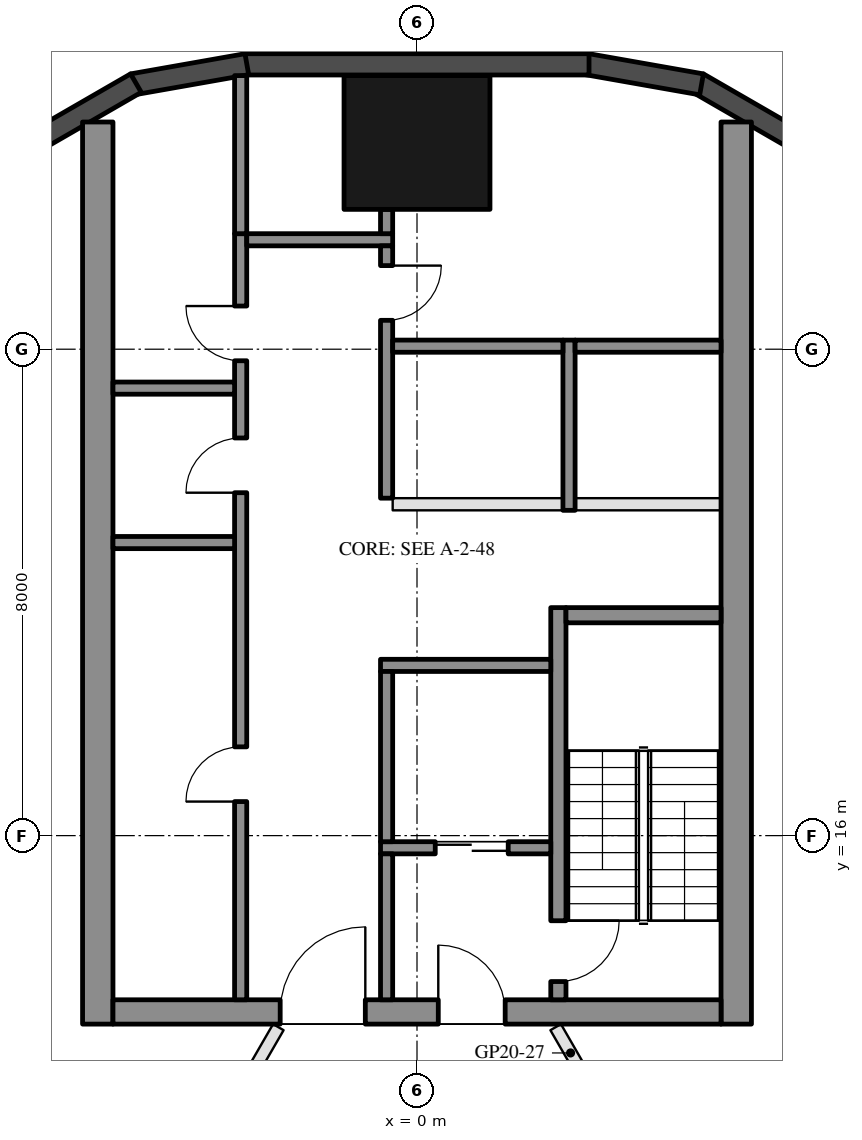
"""IFC4 building model, lengths in metres.
Left out: names, types, materials, properties, quantities, classifications, styles, units other than length and angle.
Written with IfcOpenShell. Run it as: python <this file> out.ifc"""

import sys

from ifc_helpers import new_model, si_unit, direction, frame, frame_2d, origin, origin_2d, place, context, subcontext, project, spatial, rectangle, hollow_rectangle, extrude, element, fill, save


model = new_model("IFC4")
c1 = context("Model", 3, precision=1e-05, world=origin(), true_north=direction((0.0, 1.0)))
c2 = subcontext(c1, "Body", "Model", "MODEL_VIEW")
j1 = project(units=[si_unit("LENGTHUNIT", "METRE"), si_unit("PLANEANGLEUNIT", "RADIAN")], contexts=[c1])
p1 = place(None, origin())
s1 = spatial("IfcSite", under=j1, at=p1, CompositionType="ELEMENT")
p2 = place(p1, origin())
s2 = spatial("IfcBuilding", under=s1, at=p2, CompositionType="ELEMENT")
p3 = place(p2, frame((0.0, 0.0, 209.5)))
s3 = spatial("IfcBuildingStorey", under=s2, at=p3, CompositionType="ELEMENT", Elevation=209.5)
p4 = place(p3, frame((0.0, 27.4, 0.0), z_axis=(0.0, 0.0, 1.0), x_axis=(1.0, 0.0, 0.0)))
e1 = element("IfcColumn", 1, at=p4, inside=s3, PredefinedType="COLUMN", context=c2, shape_type="SweptSolid", body=[
    extrude(hollow_rectangle(XDim=2.4, YDim=2.2, WallThickness=0.06, at=origin_2d()), origin(), (0.0, 0.0, 1.0), 3.7),
])
for number, where, z_axis, x_axis in (
    (2, (6.277, 27.422, 0.0), (0.0, 0.0, 1.0), (-0.866, 0.5, 0.0)),
    (3, (4.68, 28.356, 0.0), (0.0, 0.0, 1.0), (-0.985, 0.174, 0.0)),
):
    element("IfcWall", number, at=place(p3, frame(where, z_axis=z_axis, x_axis=x_axis)), inside=s3, PredefinedType="SOLIDWALL", context=c2, shape_type="SweptSolid", body=[
        extrude(rectangle(XDim=1.91, YDim=0.35, at=frame_2d((0.955, 0.0))), origin(), (0.0, 0.0, 1.0), 3.55),
    ])
p5 = place(p3, frame((2.829, 28.685, 0.0), z_axis=(0.0, 0.0, 1.0), x_axis=(-1.0, 0.0, 0.0)))
e4 = element("IfcWall", 4, at=p5, inside=s3, PredefinedType="SOLIDWALL", context=c2, shape_type="SweptSolid", body=[
    extrude(rectangle(XDim=5.658, YDim=0.35, at=frame_2d((2.829, 0.0))), origin(), (0.0, 0.0, 1.0), 3.55),
])
for number, where, z_axis, x_axis in (
    (5, (-2.799, 28.688, 0.0), (0.0, 0.0, 1.0), (-0.985, -0.174, 0.0)),
    (6, (-4.623, 28.377, 0.0), (0.0, 0.0, 1.0), (-0.866, -0.5, 0.0)),
):
    element("IfcWall", number, at=place(p3, frame(where, z_axis=z_axis, x_axis=x_axis)), inside=s3, PredefinedType="SOLIDWALL", context=c2, shape_type="SweptSolid", body=[
        extrude(rectangle(XDim=1.91, YDim=0.35, at=frame_2d((0.955, 0.0))), origin(), (0.0, 0.0, 1.0), 3.55),
    ])
for number, where, z_axis, x_axis in (
    (7, (5.25, 12.9, 0.0), (0.0, 0.0, 1.0), (0.0, 1.0, 0.0)),
    (8, (-5.25, 12.9, 0.0), (0.0, 0.0, 1.0), (0.0, 1.0, 0.0)),
):
    element("IfcWall", number, at=place(p3, frame(where, z_axis=z_axis, x_axis=x_axis)), inside=s3, PredefinedType="SHEAR", context=c2, shape_type="SweptSolid", body=[
        extrude(rectangle(XDim=14.837, YDim=0.5, at=frame_2d((7.418, 0.0))), origin(), (0.0, 0.0, 1.0), 3.5),
    ])
p6 = place(p3, frame((5.0, 13.1, 0.0), z_axis=(0.0, 0.0, 1.0), x_axis=(-1.0, 0.0, 0.0)))
e9 = element("IfcWall", 9, at=p6, inside=s3, PredefinedType="SHEAR", context=c2, shape_type="SweptSolid", body=[
    extrude(rectangle(XDim=10.0, YDim=0.4, at=frame_2d((5.0, 0.0))), origin(), (0.0, 0.0, 1.0), 3.5),
])
p7 = place(p6, frame((3.55, 0.0, 0.0)))
e10 = element("IfcOpeningElement", 10, at=p7, cuts=e9, PredefinedType="OPENING", context=c2, shape_type="SweptSolid", body=[
    extrude(rectangle(XDim=1.1, YDim=2.1, at=frame_2d((0.55, 1.05))), frame((0.0, 0.21, 0.0), z_axis=(0.0, -1.0, 0.0), x_axis=(1.0, 0.0, 0.0)), (0.0, 0.0, 1.0), 0.42),
])
p8 = place(p6, frame((5.85, 0.0, 0.0)))
e11 = element("IfcOpeningElement", 11, at=p8, cuts=e9, PredefinedType="OPENING", context=c2, shape_type="SweptSolid", body=[
    extrude(rectangle(XDim=1.4, YDim=2.1, at=frame_2d((0.7, 1.05))), frame((0.0, 0.21, 0.0), z_axis=(0.0, -1.0, 0.0), x_axis=(1.0, 0.0, 0.0)), (0.0, 0.0, 1.0), 0.42),
])
p9 = place(p3, frame((2.325, 13.3, 0.0), z_axis=(0.0, 0.0, 1.0), x_axis=(0.0, 1.0, 0.0)))
e12 = element("IfcWall", 12, at=p9, inside=s3, PredefinedType="SHEAR", context=c2, shape_type="SweptSolid", body=[
    extrude(rectangle(XDim=6.45, YDim=0.25, at=frame_2d((3.225, 0.0))), origin(), (0.0, 0.0, 1.0), 3.5),
])
p10 = place(p9, frame((0.3, 0.0, 0.0)))
e13 = element("IfcOpeningElement", 13, at=p10, cuts=e12, PredefinedType="OPENING", context=c2, shape_type="SweptSolid", body=[
    extrude(rectangle(XDim=1.0, YDim=2.1, at=frame_2d((0.5, 1.05))), frame((0.0, 0.135, 0.0), z_axis=(0.0, -1.0, 0.0), x_axis=(1.0, 0.0, 0.0)), (0.0, 0.0, 1.0), 0.27),
])
p11 = place(p3, frame((5.0, 19.625, 0.0), z_axis=(0.0, 0.0, 1.0), x_axis=(-1.0, 0.0, 0.0)))
e14 = element("IfcWall", 14, at=p11, inside=s3, PredefinedType="SHEAR", context=c2, shape_type="SweptSolid", body=[
    extrude(rectangle(XDim=2.55, YDim=0.25, at=frame_2d((1.275, 0.0))), origin(), (0.0, 0.0, 1.0), 3.5),
])
p12 = place(p3, frame((2.2, 18.8, 0.0), z_axis=(0.0, 0.0, 1.0), x_axis=(-1.0, 0.0, 0.0)))
e15 = element("IfcWall", 15, at=p12, inside=s3, PredefinedType="SHEAR", context=c2, shape_type="SweptSolid", body=[
    extrude(rectangle(XDim=2.8, YDim=0.2, at=frame_2d((1.4, 0.0))), origin(), (0.0, 0.0, 1.0), 3.5),
])
p13 = place(p3, frame((2.2, 15.8, 0.0), z_axis=(0.0, 0.0, 1.0), x_axis=(-1.0, 0.0, 0.0)))
e16 = element("IfcWall", 16, at=p13, inside=s3, PredefinedType="SHEAR", context=c2, shape_type="SweptSolid", body=[
    extrude(rectangle(XDim=2.8, YDim=0.2, at=frame_2d((1.4, 0.0))), origin(), (0.0, 0.0, 1.0), 3.5),
])
p14 = place(p13, frame((0.7, 0.0, 0.0)))
e17 = element("IfcOpeningElement", 17, at=p14, cuts=e16, PredefinedType="OPENING", context=c2, shape_type="SweptSolid", body=[
    extrude(rectangle(XDim=1.2, YDim=2.1, at=frame_2d((0.6, 1.05))), frame((0.0, 0.11, 0.0), z_axis=(0.0, -1.0, 0.0), x_axis=(1.0, 0.0, 0.0)), (0.0, 0.0, 1.0), 0.22),
])
p15 = place(p3, frame((-0.5, 15.9, 0.0), z_axis=(0.0, 0.0, 1.0), x_axis=(0.0, 1.0, 0.0)))
e18 = element("IfcWall", 18, at=p15, inside=s3, PredefinedType="SHEAR", context=c2, shape_type="SweptSolid", body=[
    extrude(rectangle(XDim=2.8, YDim=0.2, at=frame_2d((1.4, 0.0))), origin(), (0.0, 0.0, 1.0), 3.5),
])
p16 = place(p3, frame((-0.5, 13.3, 0.0), z_axis=(0.0, 0.0, 1.0), x_axis=(0.0, 1.0, 0.0)))
e19 = element("IfcWall", 19, at=p16, inside=s3, PredefinedType="SHEAR", context=c2, shape_type="SweptSolid", body=[
    extrude(rectangle(XDim=2.4, YDim=0.2, at=frame_2d((1.2, 0.0))), origin(), (0.0, 0.0, 1.0), 3.5),
])
p17 = place(p3, frame((-2.9, 13.3, 0.0), z_axis=(0.0, 0.0, 1.0), x_axis=(0.0, 1.0, 0.0)))
e20 = element("IfcWall", 20, at=p17, inside=s3, PredefinedType="SHEAR", context=c2, shape_type="SweptSolid", body=[
    extrude(rectangle(XDim=12.6, YDim=0.2, at=frame_2d((6.3, 0.0))), origin(), (0.0, 0.0, 1.0), 3.5),
])
p18 = place(p17, frame((3.26, 0.0, 0.0)))
e21 = element("IfcOpeningElement", 21, at=p18, cuts=e20, PredefinedType="OPENING", context=c2, shape_type="SweptSolid", body=[
    extrude(rectangle(XDim=0.9, YDim=2.1, at=frame_2d((0.45, 1.05))), frame((0.0, 0.11, 0.0), z_axis=(0.0, -1.0, 0.0), x_axis=(1.0, 0.0, 0.0)), (0.0, 0.0, 1.0), 0.22),
])
p19 = place(p17, frame((8.34, 0.0, 0.0)))
e22 = element("IfcOpeningElement", 22, at=p19, cuts=e20, PredefinedType="OPENING", context=c2, shape_type="SweptSolid", body=[
    extrude(rectangle(XDim=0.9, YDim=2.1, at=frame_2d((0.45, 1.05))), frame((0.0, 0.11, 0.0), z_axis=(0.0, -1.0, 0.0), x_axis=(1.0, 0.0, 0.0)), (0.0, 0.0, 1.0), 0.22),
])
p20 = place(p17, frame((10.51, 0.0, 0.0)))
e23 = element("IfcOpeningElement", 23, at=p20, cuts=e20, PredefinedType="OPENING", context=c2, shape_type="SweptSolid", body=[
    extrude(rectangle(XDim=0.9, YDim=2.1, at=frame_2d((0.45, 1.05))), frame((0.0, 0.11, 0.0), z_axis=(0.0, -1.0, 0.0), x_axis=(1.0, 0.0, 0.0)), (0.0, 0.0, 1.0), 0.22),
])
p21 = place(p3, frame((-0.4, 25.8, 0.0), z_axis=(0.0, 0.0, 1.0), x_axis=(-1.0, 0.0, 0.0)))
e24 = element("IfcWall", 24, at=p21, inside=s3, PredefinedType="SHEAR", context=c2, shape_type="SweptSolid", body=[
    extrude(rectangle(XDim=2.4, YDim=0.2, at=frame_2d((1.2, 0.0))), origin(), (0.0, 0.0, 1.0), 3.5),
])
p22 = place(p3, frame((-0.5, 21.55, 0.0), z_axis=(0.0, 0.0, 1.0), x_axis=(0.0, 1.0, 0.0)))
e25 = element("IfcWall", 25, at=p22, inside=s3, PredefinedType="SHEAR", context=c2, shape_type="SweptSolid", body=[
    extrude(rectangle(XDim=4.15, YDim=0.2, at=frame_2d((2.075, 0.0))), origin(), (0.0, 0.0, 1.0), 3.5),
])
p23 = place(p22, frame((2.925, 0.0, 0.0)))
e26 = element("IfcOpeningElement", 26, at=p23, cuts=e25, PredefinedType="OPENING", context=c2, shape_type="SweptSolid", body=[
    extrude(rectangle(XDim=0.9, YDim=2.1, at=frame_2d((0.45, 1.05))), frame((0.0, 0.11, 0.0), z_axis=(0.0, -1.0, 0.0), x_axis=(1.0, 0.0, 0.0)), (0.0, 0.0, 1.0), 0.22),
])
for number, where, z_axis, x_axis in (
    (27, (-3.0, 20.82, 0.0), (0.0, 0.0, 1.0), (-1.0, 0.0, 0.0)),
    (28, (-3.0, 23.36, 0.0), (0.0, 0.0, 1.0), (-1.0, 0.0, 0.0)),
):
    element("IfcWall", number, at=place(p3, frame(where, z_axis=z_axis, x_axis=x_axis)), inside=s3, PredefinedType="SHEAR", context=c2, shape_type="SweptSolid", body=[
        extrude(rectangle(XDim=2.0, YDim=0.2, at=frame_2d((1.0, 0.0))), origin(), (0.0, 0.0, 1.0), 3.5),
    ])
p24 = place(p3, frame((-0.5, 25.9, 0.0), z_axis=(0.0, 0.0, 1.0), x_axis=(0.0, 1.0, 0.0)))
e29 = element("IfcWall", 29, at=p24, inside=s3, PredefinedType="SHEAR", context=c2, shape_type="SweptSolid", body=[
    extrude(rectangle(XDim=0.4, YDim=0.2, at=frame_2d((0.2, 0.0))), origin(), (0.0, 0.0, 1.0), 3.5),
])
p25 = place(p3, frame((-2.9, 25.9, 0.0), z_axis=(0.0, 0.0, 1.0), x_axis=(0.0, 1.0, 0.0)))
e30 = element("IfcWall", 30, at=p25, inside=s3, PredefinedType="SHEAR", context=c2, shape_type="SweptSolid", body=[
    extrude(rectangle(XDim=2.6, YDim=0.2, at=frame_2d((1.3, 0.0))), origin(), (0.0, 0.0, 1.0), 3.5),
])
p26 = place(p3, frame((2.5, 21.35, 0.0), z_axis=(0.0, 0.0, 1.0), x_axis=(0.0, 1.0, 0.0)))
e31 = element("IfcWall", 31, at=p26, inside=s3, PredefinedType="SHEAR", context=c2, shape_type="SweptSolid", body=[
    extrude(rectangle(XDim=2.8, YDim=0.2, at=frame_2d((1.4, 0.0))), origin(), (0.0, 0.0, 1.0), 3.5),
])
p27 = place(p3, frame((5.0, 24.05, 0.0), z_axis=(0.0, 0.0, 1.0), x_axis=(-1.0, 0.0, 0.0)))
e32 = element("IfcWall", 32, at=p27, inside=s3, PredefinedType="SHEAR", context=c2, shape_type="SweptSolid", body=[
    extrude(rectangle(XDim=2.4, YDim=0.2, at=frame_2d((1.2, 0.0))), origin(), (0.0, 0.0, 1.0), 3.5),
])
p28 = place(p3, frame((2.4, 24.05, 0.0), z_axis=(0.0, 0.0, 1.0), x_axis=(-1.0, 0.0, 0.0)))
e33 = element("IfcWall", 33, at=p28, inside=s3, PredefinedType="SHEAR", context=c2, shape_type="SweptSolid", body=[
    extrude(rectangle(XDim=2.8, YDim=0.2, at=frame_2d((1.4, 0.0))), origin(), (0.0, 0.0, 1.0), 3.5),
])
p29 = place(p3, frame((5.0, 21.45, 0.0), z_axis=(0.0, 0.0, 1.0), x_axis=(-1.0, 0.0, 0.0)))
e34 = element("IfcWall", 34, at=p29, inside=s3, PredefinedType="PARTITIONING", context=c2, shape_type="SweptSolid", body=[
    extrude(rectangle(XDim=2.4, YDim=0.2, at=frame_2d((1.2, 0.0))), origin(), (0.0, 0.0, 1.0), 3.5),
])
p30 = place(p3, frame((2.4, 21.45, 0.0), z_axis=(0.0, 0.0, 1.0), x_axis=(-1.0, 0.0, 0.0)))
e35 = element("IfcWall", 35, at=p30, inside=s3, PredefinedType="PARTITIONING", context=c2, shape_type="SweptSolid", body=[
    extrude(rectangle(XDim=2.8, YDim=0.2, at=frame_2d((1.4, 0.0))), origin(), (0.0, 0.0, 1.0), 3.5),
])
p31 = place(p3, frame((14.087, 14.161, 0.0), z_axis=(0.0, 0.0, 1.0), x_axis=(-0.891639053189, -0.452746947895, 0.0)))
e36 = element("IfcWall", 36, at=p31, inside=s3, PredefinedType="PARTITIONING", context=c2, shape_type="SweptSolid", body=[
    extrude(rectangle(XDim=10.996, YDim=0.2, at=frame_2d((5.498, 0.0))), origin(), (0.0, 0.0, 1.0), 3.06),
])
p32 = place(p3, frame((-13.018, 14.213, 0.0), z_axis=(0.0, 0.0, 1.0), x_axis=(0.866022637375, -0.500004791531, 0.0)))
e37 = element("IfcWall", 37, at=p32, inside=s3, PredefinedType="PARTITIONING", context=c2, shape_type="SweptSolid", body=[
    extrude(rectangle(XDim=10.08, YDim=0.2, at=frame_2d((5.04, 0.0))), origin(), (0.0, 0.0, 1.0), 3.06),
])
p33 = place(p3, frame((2.281, 12.85, 0.0), z_axis=(0.0, 0.0, 1.0), x_axis=(0.500010586081, -0.866019291821, 0.0)))
e38 = element("IfcWall", 38, at=p33, inside=s3, PredefinedType="PARTITIONING", context=c2, shape_type="SweptSolid", body=[
    extrude(rectangle(XDim=4.083, YDim=0.2, at=frame_2d((2.042, 0.0))), origin(), (0.0, 0.0, 1.0), 2.95),
])
p34 = place(p33, frame((1.541, 0.0, 0.0)))
e39 = element("IfcOpeningElement", 39, at=p34, cuts=e38, PredefinedType="OPENING", context=c2, shape_type="SweptSolid", body=[
    extrude(rectangle(XDim=1.0, YDim=2.1, at=frame_2d((0.5, 1.05))), frame((0.0, 0.11, 0.0), z_axis=(0.0, -1.0, 0.0), x_axis=(1.0, 0.0, 0.0)), (0.0, 0.0, 1.0), 0.22),
])
p35 = place(p3, frame((-4.325, 9.31, 0.0), z_axis=(0.0, 0.0, 1.0), x_axis=(0.500011931275, 0.86601851515, 0.0)))
e40 = element("IfcWall", 40, at=p35, inside=s3, PredefinedType="PARTITIONING", context=c2, shape_type="SweptSolid", body=[
    extrude(rectangle(XDim=4.088, YDim=0.2, at=frame_2d((2.044, 0.0))), origin(), (0.0, 0.0, 1.0), 2.95),
])
p36 = place(p35, frame((1.544, 0.0, 0.0)))
e41 = element("IfcOpeningElement", 41, at=p36, cuts=e40, PredefinedType="OPENING", context=c2, shape_type="SweptSolid", body=[
    extrude(rectangle(XDim=1.0, YDim=2.1, at=frame_2d((0.5, 1.05))), frame((0.0, 0.11, 0.0), z_axis=(0.0, -1.0, 0.0), x_axis=(1.0, 0.0, 0.0)), (0.0, 0.0, 1.0), 0.22),
])
p37 = place(p14, origin())
e42 = element("IfcDoor", 42, at=p37, inside=s3, OperationType="DOUBLE_DOOR_SLIDING", PredefinedType="DOOR", context=c2, shape_type="SweptSolid", body=[
    extrude(rectangle(XDim=1.2, YDim=2.1, at=frame_2d((0.6, 1.05))), frame((0.0, 0.025, 0.0), z_axis=(0.0, -1.0, 0.0), x_axis=(1.0, 0.0, 0.0)), (0.0, 0.0, 1.0), 0.05),
])
fill(e17, e42)
p38 = place(p18, origin())
e43 = element("IfcDoor", 43, at=p38, inside=s3, OperationType="SINGLE_SWING_LEFT", PredefinedType="DOOR", context=c2, shape_type="SweptSolid", body=[
    extrude(rectangle(XDim=0.9, YDim=2.1, at=frame_2d((0.45, 1.05))), frame((0.0, 0.025, 0.0), z_axis=(0.0, -1.0, 0.0), x_axis=(1.0, 0.0, 0.0)), (0.0, 0.0, 1.0), 0.05),
])
fill(e21, e43)
p39 = place(p19, origin())
e44 = element("IfcDoor", 44, at=p39, inside=s3, OperationType="SINGLE_SWING_LEFT", PredefinedType="DOOR", context=c2, shape_type="SweptSolid", body=[
    extrude(rectangle(XDim=0.9, YDim=2.1, at=frame_2d((0.45, 1.05))), frame((0.0, 0.025, 0.0), z_axis=(0.0, -1.0, 0.0), x_axis=(1.0, 0.0, 0.0)), (0.0, 0.0, 1.0), 0.05),
])
fill(e22, e44)
p40 = place(p20, origin())
e45 = element("IfcDoor", 45, at=p40, inside=s3, OperationType="SINGLE_SWING_RIGHT", PredefinedType="DOOR", context=c2, shape_type="SweptSolid", body=[
    extrude(rectangle(XDim=0.9, YDim=2.1, at=frame_2d((0.45, 1.05))), frame((0.0, 0.025, 0.0), z_axis=(0.0, -1.0, 0.0), x_axis=(1.0, 0.0, 0.0)), (0.0, 0.0, 1.0), 0.05),
])
fill(e23, e45)
p41 = place(p23, frame((0.9, 0.0, 0.0), z_axis=(0.0, 0.0, 1.0), x_axis=(-1.0, 0.0, 0.0)))
e46 = element("IfcDoor", 46, at=p41, inside=s3, OperationType="SINGLE_SWING_LEFT", PredefinedType="DOOR", context=c2, shape_type="SweptSolid", body=[
    extrude(rectangle(XDim=0.9, YDim=2.1, at=frame_2d((0.45, 1.05))), frame((0.0, 0.025, 0.0), z_axis=(0.0, -1.0, 0.0), x_axis=(1.0, 0.0, 0.0)), (0.0, 0.0, 1.0), 0.05),
])
fill(e26, e46)
p42 = place(p7, frame((1.1, 0.0, 0.0), z_axis=(0.0, 0.0, 1.0), x_axis=(-1.0, 0.0, 0.0)))
e47 = element("IfcDoor", 47, at=p42, inside=s3, OperationType="SINGLE_SWING_LEFT", PredefinedType="DOOR", context=c2, shape_type="SweptSolid", body=[
    extrude(rectangle(XDim=1.1, YDim=2.1, at=frame_2d((0.55, 1.05))), frame((0.0, 0.025, 0.0), z_axis=(0.0, -1.0, 0.0), x_axis=(1.0, 0.0, 0.0)), (0.0, 0.0, 1.0), 0.05),
])
fill(e10, e47)
p43 = place(p8, frame((1.4, 0.0, 0.0), z_axis=(0.0, 0.0, 1.0), x_axis=(-1.0, 0.0, 0.0)))
e48 = element("IfcDoor", 48, at=p43, inside=s3, OperationType="DOUBLE_DOOR_SINGLE_SWING", PredefinedType="DOOR", context=c2, shape_type="SweptSolid", body=[
    extrude(rectangle(XDim=1.4, YDim=2.1, at=frame_2d((0.7, 1.05))), frame((0.0, 0.025, 0.0), z_axis=(0.0, -1.0, 0.0), x_axis=(1.0, 0.0, 0.0)), (0.0, 0.0, 1.0), 0.05),
])
fill(e11, e48)
p44 = place(p10, frame((1.0, 0.0, 0.0), z_axis=(0.0, 0.0, 1.0), x_axis=(-1.0, 0.0, 0.0)))
e49 = element("IfcDoor", 49, at=p44, inside=s3, OperationType="SINGLE_SWING_LEFT", PredefinedType="DOOR", context=c2, shape_type="SweptSolid", body=[
    extrude(rectangle(XDim=1.0, YDim=2.1, at=frame_2d((0.5, 1.05))), frame((0.0, 0.025, 0.0), z_axis=(0.0, -1.0, 0.0), x_axis=(1.0, 0.0, 0.0)), (0.0, 0.0, 1.0), 0.05),
])
fill(e13, e49)
save(model, sys.argv[1])
